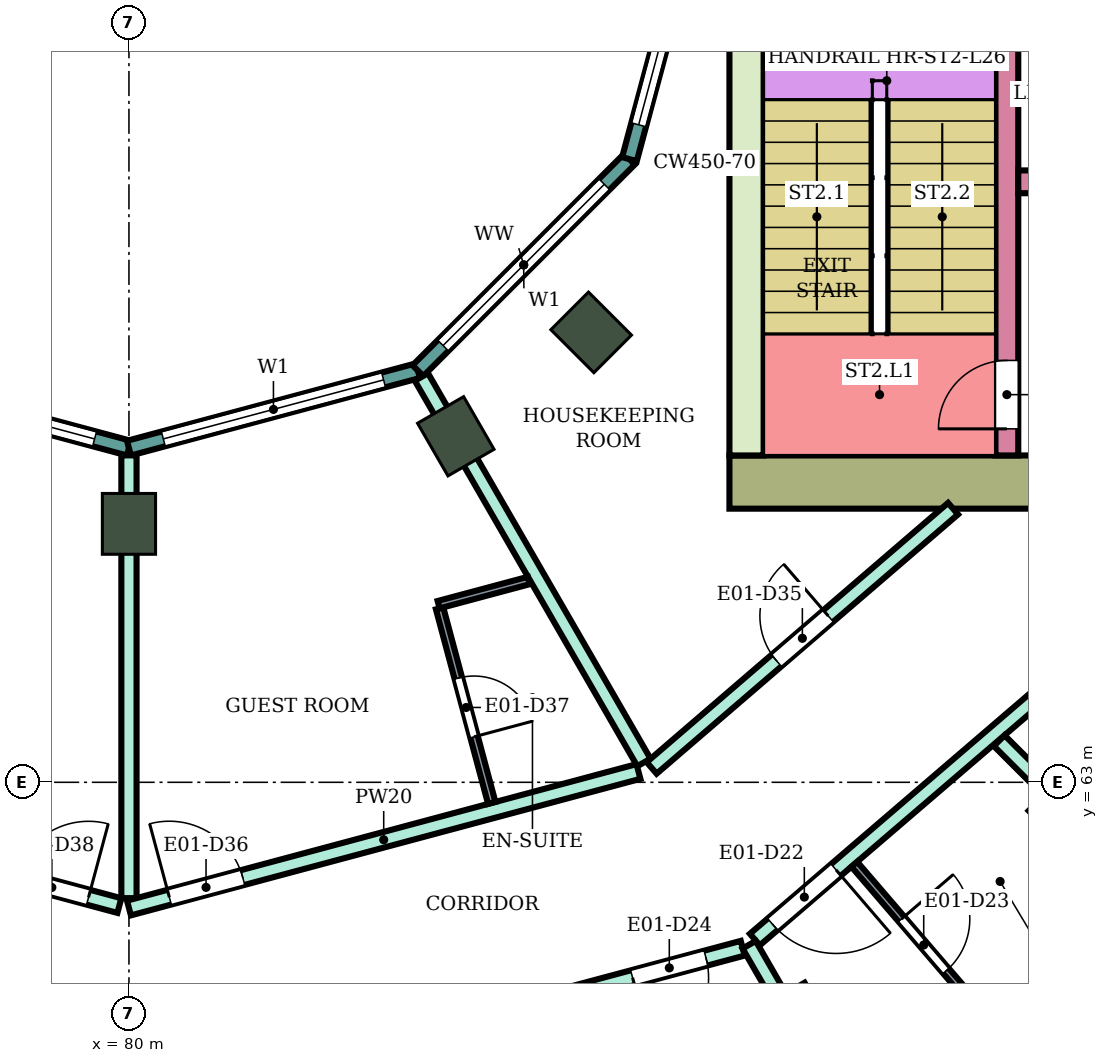
"""IFC4 building model, lengths in metres.
Left out: names, types, materials, properties, quantities, classifications, styles, units other than length and angle.
Written with IfcOpenShell. Run it as: python <this file> out.ifc"""

import sys

from ifc_helpers import new_model, si_unit, direction, frame, frame_2d, origin, origin_2d, place, context, subcontext, project, spatial, rectangle, extrude, element, fill, save


model = new_model("IFC4")
c1 = context("Model", 3, precision=1e-05, world=origin(), true_north=direction((0.0, 1.0)))
c2 = subcontext(c1, "Body", "Model", "MODEL_VIEW")
j1 = project(units=[si_unit("LENGTHUNIT", "METRE"), si_unit("PLANEANGLEUNIT", "RADIAN")], contexts=[c1])
p1 = place(None, origin())
s1 = spatial("IfcSite", under=j1, at=p1, CompositionType="ELEMENT")
p2 = place(p1, origin())
s2 = spatial("IfcBuilding", under=s1, at=p2, CompositionType="ELEMENT")
p3 = place(p2, frame((0.0, 0.0, 114.6)))
s3 = spatial("IfcBuildingStorey", under=s2, at=p3, CompositionType="ELEMENT", Elevation=114.6)
for number, where, z_axis, x_axis in (
    (1, (88.8, 59.758, 0.0), (0.0, 0.0, 1.0), (0.5, -0.866, 0.0)),
    (2, (92.445, 62.555, 0.0), (0.0, 0.0, 1.0), (0.707, -0.707, 0.0)),
):
    element("IfcColumn", number, at=place(p3, frame(where, z_axis=z_axis, x_axis=x_axis)), inside=s3, PredefinedType="COLUMN", context=c2, shape_type="SweptSolid", body=[
        extrude(rectangle(XDim=1.0, YDim=0.8, at=origin_2d()), origin(), (0.0, 0.0, 1.0), 3.9),
    ])
for number, where, z_axis, x_axis in (
    (3, (80.0, 66.4, 0.0), (0.0, 0.0, 1.0), (0.0, -1.0, 0.0)),
    (4, (84.3, 67.552, 0.0), (0.0, 0.0, 1.0), (0.5, -0.866, 0.0)),
    (5, (86.081, 68.919, 0.0), (0.0, 0.0, 1.0), (0.707, -0.707, 0.0)),
):
    element("IfcColumn", number, at=place(p3, frame(where, z_axis=z_axis, x_axis=x_axis)), inside=s3, PredefinedType="COLUMN", context=c2, shape_type="SweptSolid", body=[
        extrude(rectangle(XDim=0.8, YDim=0.7, at=origin_2d()), origin(), (0.0, 0.0, 1.0), 3.9),
    ])
p4 = place(p3, frame((87.9, 66.95, 0.0), z_axis=(0.0, 0.0, 1.0), x_axis=(1.0, 0.0, 0.0)))
e6 = element("IfcWall", 6, at=p4, inside=s3, PredefinedType="SHEAR", context=c2, shape_type="SweptSolid", body=[
    extrude(rectangle(XDim=14.8, YDim=0.7, at=frame_2d((7.4, 0.0))), origin(), (0.0, 0.0, 1.0), 3.58),
])
p5 = place(p4, frame((4.2, 0.0, 0.0)))
e7 = element("IfcOpeningElement", 7, at=p5, cuts=e6, PredefinedType="OPENING", context=c2, shape_type="SweptSolid", body=[
    extrude(rectangle(XDim=2.4, YDim=2.4, at=frame_2d((1.2, 1.2))), frame((0.0, 0.36, 0.0), z_axis=(0.0, -1.0, 0.0), x_axis=(1.0, 0.0, 0.0)), (0.0, 0.0, 1.0), 0.72),
])
p6 = place(p3, frame((88.125, 67.3, 0.0), z_axis=(0.0, 0.0, 1.0), x_axis=(0.0, 1.0, 0.0)))
e8 = element("IfcWall", 8, at=p6, inside=s3, PredefinedType="SHEAR", context=c2, shape_type="SweptSolid", body=[
    extrude(rectangle(XDim=7.7, YDim=0.45, at=frame_2d((3.85, 0.0))), origin(), (0.0, 0.0, 1.0), 3.58),
])
p7 = place(p3, frame((91.55, 67.3, 0.0), z_axis=(0.0, 0.0, 1.0), x_axis=(0.0, 1.0, 0.0)))
e9 = element("IfcWall", 9, at=p7, inside=s3, PredefinedType="SHEAR", context=c2, shape_type="SweptSolid", body=[
    extrude(rectangle(XDim=7.7, YDim=0.3, at=frame_2d((3.85, 0.0))), origin(), (0.0, 0.0, 1.0), 3.58),
])
p8 = place(p7, frame((0.35, 0.0, 0.0)))
e10 = element("IfcOpeningElement", 10, at=p8, cuts=e9, PredefinedType="OPENING", context=c2, shape_type="SweptSolid", body=[
    extrude(rectangle(XDim=0.9, YDim=2.1, at=frame_2d((0.45, 1.05))), frame((0.0, 0.16, 0.0), z_axis=(0.0, -1.0, 0.0), x_axis=(1.0, 0.0, 0.0)), (0.0, 0.0, 1.0), 0.32),
])
p9 = place(p3, frame((91.7, 70.9, 0.0), z_axis=(0.0, 0.0, 1.0), x_axis=(1.0, 0.0, 0.0)))
e11 = element("IfcWall", 11, at=p9, inside=s3, PredefinedType="SHEAR", context=c2, shape_type="SweptSolid", body=[
    extrude(rectangle(XDim=11.0, YDim=0.3, at=frame_2d((5.5, 0.0))), origin(), (0.0, 0.0, 1.0), 3.58),
])
p10 = place(p9, frame((0.4, 0.0, 0.0)))
e12 = element("IfcOpeningElement", 12, at=p10, cuts=e11, PredefinedType="OPENING", context=c2, shape_type="SweptSolid", body=[
    extrude(rectangle(XDim=1.4, YDim=2.1, at=frame_2d((0.7, 1.05))), frame((0.0, 0.16, 0.0), z_axis=(0.0, -1.0, 0.0), x_axis=(1.0, 0.0, 0.0)), (0.0, 0.0, 1.0), 0.32),
])
p11 = place(p9, frame((5.4, 0.0, 0.0)))
e13 = element("IfcOpeningElement", 13, at=p11, cuts=e11, PredefinedType="OPENING", context=c2, shape_type="SweptSolid", body=[
    extrude(rectangle(XDim=1.4, YDim=2.1, at=frame_2d((0.7, 1.05))), frame((0.0, 0.16, 0.0), z_axis=(0.0, -1.0, 0.0), x_axis=(1.0, 0.0, 0.0)), (0.0, 0.0, 1.0), 0.32),
])
p12 = place(p9, frame((8.1, 0.0, 0.0)))
e14 = element("IfcOpeningElement", 14, at=p12, cuts=e11, PredefinedType="OPENING", context=c2, shape_type="SweptSolid", body=[
    extrude(rectangle(XDim=1.0, YDim=2.1, at=frame_2d((0.5, 1.05))), frame((0.0, 0.16, 0.0), z_axis=(0.0, -1.0, 0.0), x_axis=(1.0, 0.0, 0.0)), (0.0, 0.0, 1.0), 0.32),
])
p13 = place(p3, frame((76.198, 68.415, 0.0), z_axis=(0.0, 0.0, 1.0), x_axis=(0.965933654434, -0.258789828301, 0.0)))
e15 = element("IfcWall", 15, at=p13, inside=s3, PredefinedType="NOTDEFINED", context=c2, shape_type="SweptSolid", body=[
    extrude(rectangle(XDim=3.936, YDim=0.2, at=frame_2d((1.968, 0.0))), origin(), (0.0, 0.0, 1.0), 3.9),
])
p14 = place(p13, frame((0.468, 0.0, 0.9)))
e16 = element("IfcOpeningElement", 16, at=p14, cuts=e15, PredefinedType="OPENING", context=c2, shape_type="SweptSolid", body=[
    extrude(rectangle(XDim=3.0, YDim=2.3, at=frame_2d((1.5, 1.15))), frame((0.0, 0.11, 0.0), z_axis=(0.0, -1.0, 0.0), x_axis=(1.0, 0.0, 0.0)), (0.0, 0.0, 1.0), 0.22),
])
p15 = place(p3, frame((80.0, 67.396, 0.0), z_axis=(0.0, 0.0, 1.0), x_axis=(0.965933654434, 0.258789828301, 0.0)))
e17 = element("IfcWall", 17, at=p15, inside=s3, PredefinedType="NOTDEFINED", context=c2, shape_type="SweptSolid", body=[
    extrude(rectangle(XDim=3.936, YDim=0.2, at=frame_2d((1.968, 0.0))), origin(), (0.0, 0.0, 1.0), 3.9),
])
p16 = place(p15, frame((0.468, 0.0, 0.9)))
e18 = element("IfcOpeningElement", 18, at=p16, cuts=e17, PredefinedType="OPENING", context=c2, shape_type="SweptSolid", body=[
    extrude(rectangle(XDim=3.0, YDim=2.3, at=frame_2d((1.5, 1.15))), frame((0.0, 0.11, 0.0), z_axis=(0.0, -1.0, 0.0), x_axis=(1.0, 0.0, 0.0)), (0.0, 0.0, 1.0), 0.22),
])
p17 = place(p3, frame((83.802, 68.415, 0.0), z_axis=(0.0, 0.0, 1.0), x_axis=(0.707106781187, 0.707106781187, 0.0)))
e19 = element("IfcWall", 19, at=p17, inside=s3, PredefinedType="NOTDEFINED", context=c2, shape_type="SweptSolid", body=[
    extrude(rectangle(XDim=3.936, YDim=0.2, at=frame_2d((1.968, 0.0))), origin(), (0.0, 0.0, 1.0), 3.9),
])
p18 = place(p17, frame((0.468, 0.0, 0.9)))
e20 = element("IfcOpeningElement", 20, at=p18, cuts=e19, PredefinedType="OPENING", context=c2, shape_type="SweptSolid", body=[
    extrude(rectangle(XDim=3.0, YDim=2.3, at=frame_2d((1.5, 1.15))), frame((0.0, 0.11, 0.0), z_axis=(0.0, -1.0, 0.0), x_axis=(1.0, 0.0, 0.0)), (0.0, 0.0, 1.0), 0.22),
])
p19 = place(p3, frame((86.585, 71.198, 0.0), z_axis=(0.0, 0.0, 1.0), x_axis=(0.258789828301, 0.965933654434, 0.0)))
e21 = element("IfcWall", 21, at=p19, inside=s3, PredefinedType="NOTDEFINED", context=c2, shape_type="SweptSolid", body=[
    extrude(rectangle(XDim=3.936, YDim=0.2, at=frame_2d((1.968, 0.0))), origin(), (0.0, 0.0, 1.0), 3.9),
])
p20 = place(p19, frame((0.468, 0.0, 0.9)))
e22 = element("IfcOpeningElement", 22, at=p20, cuts=e21, PredefinedType="OPENING", context=c2, shape_type="SweptSolid", body=[
    extrude(rectangle(XDim=3.0, YDim=2.3, at=frame_2d((1.5, 1.15))), frame((0.0, 0.11, 0.0), z_axis=(0.0, -1.0, 0.0), x_axis=(1.0, 0.0, 0.0)), (0.0, 0.0, 1.0), 0.22),
])
p21 = place(p3, frame((71.877, 60.832, 0.0), z_axis=(0.0, 0.0, 1.0), x_axis=(0.965857276008, -0.259074742848, 0.0)))
e23 = element("IfcWall", 23, at=p21, inside=s3, PredefinedType="PARTITIONING", context=c2, shape_type="SweptSolid", body=[
    extrude(rectangle(XDim=8.36, YDim=0.2, at=frame_2d((4.18, 0.0))), origin(), (0.0, 0.0, 1.0), 3.45),
])
p22 = place(p21, frame((0.55, 0.0, 0.0)))
e24 = element("IfcOpeningElement", 24, at=p22, cuts=e23, PredefinedType="OPENING", context=c2, shape_type="SweptSolid", body=[
    extrude(rectangle(XDim=1.0, YDim=2.1, at=frame_2d((0.5, 1.05))), frame((0.0, 0.11, 0.0), z_axis=(0.0, -1.0, 0.0), x_axis=(1.0, 0.0, 0.0)), (0.0, 0.0, 1.0), 0.22),
])
p23 = place(p3, frame((73.297, 63.143, 0.0), z_axis=(0.0, 0.0, 1.0), x_axis=(0.965859030528, -0.25906820173, 0.0)))
e25 = element("IfcWall", 25, at=p23, inside=s3, PredefinedType="PARTITIONING", context=c2, shape_type="SweptSolid", body=[
    extrude(rectangle(XDim=6.81, YDim=0.2, at=frame_2d((3.405, 0.0))), origin(), (0.0, 0.0, 1.0), 3.45),
])
p24 = place(p23, frame((5.39, 0.0, 0.0)))
e26 = element("IfcOpeningElement", 26, at=p24, cuts=e25, PredefinedType="OPENING", context=c2, shape_type="SweptSolid", body=[
    extrude(rectangle(XDim=1.0, YDim=2.1, at=frame_2d((0.5, 1.05))), frame((0.0, 0.11, 0.0), z_axis=(0.0, -1.0, 0.0), x_axis=(1.0, 0.0, 0.0)), (0.0, 0.0, 1.0), 0.22),
])
p25 = place(p3, frame((80.0, 58.655, 0.0), z_axis=(0.0, 0.0, 1.0), x_axis=(0.965967338894, 0.258664068224, 0.0)))
e27 = element("IfcWall", 27, at=p25, inside=s3, PredefinedType="PARTITIONING", context=c2, shape_type="SweptSolid", body=[
    extrude(rectangle(XDim=8.36, YDim=0.2, at=frame_2d((4.18, 0.0))), origin(), (0.0, 0.0, 1.0), 3.45),
])
p26 = place(p25, frame((6.86, 0.0, 0.0)))
e28 = element("IfcOpeningElement", 28, at=p26, cuts=e27, PredefinedType="OPENING", context=c2, shape_type="SweptSolid", body=[
    extrude(rectangle(XDim=1.0, YDim=2.1, at=frame_2d((0.5, 1.05))), frame((0.0, 0.11, 0.0), z_axis=(0.0, -1.0, 0.0), x_axis=(1.0, 0.0, 0.0)), (0.0, 0.0, 1.0), 0.22),
])
p27 = place(p25, frame((2.7, 0.0, 0.0)))
e29 = element("IfcOpeningElement", 29, at=p27, cuts=e27, PredefinedType="OPENING", context=c2, shape_type="SweptSolid", body=[
    extrude(rectangle(XDim=1.0, YDim=2.1, at=frame_2d((0.5, 1.05))), frame((0.0, 0.11, 0.0), z_axis=(0.0, -1.0, 0.0), x_axis=(1.0, 0.0, 0.0)), (0.0, 0.0, 1.0), 0.22),
])
p28 = place(p3, frame((80.0, 61.476, 0.0), z_axis=(0.0, 0.0, 1.0), x_axis=(0.0, 1.0, 0.0)))
e30 = element("IfcWall", 30, at=p28, inside=s3, PredefinedType="PARTITIONING", context=c2, shape_type="SweptSolid", body=[
    extrude(rectangle(XDim=5.825, YDim=0.2, at=frame_2d((2.913, 0.0))), origin(), (0.0, 0.0, 1.0), 3.45),
])
p29 = place(p3, frame((80.0, 61.346, 0.0), z_axis=(0.0, 0.0, 1.0), x_axis=(0.965924181808, 0.258825182312, 0.0)))
e31 = element("IfcWall", 31, at=p29, inside=s3, PredefinedType="PARTITIONING", context=c2, shape_type="SweptSolid", body=[
    extrude(rectangle(XDim=6.94, YDim=0.2, at=frame_2d((3.47, 0.0))), origin(), (0.0, 0.0, 1.0), 3.45),
])
p30 = place(p29, frame((0.55, 0.0, 0.0)))
e32 = element("IfcOpeningElement", 32, at=p30, cuts=e31, PredefinedType="OPENING", context=c2, shape_type="SweptSolid", body=[
    extrude(rectangle(XDim=1.0, YDim=2.1, at=frame_2d((0.5, 1.05))), frame((0.0, 0.11, 0.0), z_axis=(0.0, -1.0, 0.0), x_axis=(1.0, 0.0, 0.0)), (0.0, 0.0, 1.0), 0.22),
])
p31 = place(p3, frame((83.848, 68.332, 0.0), z_axis=(0.0, 0.0, 1.0), x_axis=(0.499933000352, -0.866064082594, 0.0)))
e33 = element("IfcWall", 33, at=p31, inside=s3, PredefinedType="PARTITIONING", context=c2, shape_type="SweptSolid", body=[
    extrude(rectangle(XDim=5.855, YDim=0.2, at=frame_2d((2.928, 0.0))), origin(), (0.0, 0.0, 1.0), 3.45),
])
p32 = place(p3, frame((86.877, 63.189, 0.0), z_axis=(0.0, 0.0, 1.0), x_axis=(0.758075808328, 0.652166442581, 0.0)))
e34 = element("IfcWall", 34, at=p32, inside=s3, PredefinedType="PARTITIONING", context=c2, shape_type="SweptSolid", body=[
    extrude(rectangle(XDim=5.23, YDim=0.2, at=frame_2d((2.615, 0.0))), origin(), (0.0, 0.0, 1.0), 3.45),
])
p33 = place(p32, frame((2.165, 0.0, 0.0)))
e35 = element("IfcOpeningElement", 35, at=p33, cuts=e34, PredefinedType="OPENING", context=c2, shape_type="SweptSolid", body=[
    extrude(rectangle(XDim=0.9, YDim=2.1, at=frame_2d((0.45, 1.05))), frame((0.0, 0.11, 0.0), z_axis=(0.0, -1.0, 0.0), x_axis=(1.0, 0.0, 0.0)), (0.0, 0.0, 1.0), 0.22),
])
p34 = place(p3, frame((88.235, 60.931, 0.0), z_axis=(0.0, 0.0, 1.0), x_axis=(0.758816241808, 0.651304775945, 0.0)))
e36 = element("IfcWall", 36, at=p34, inside=s3, PredefinedType="PARTITIONING", context=c2, shape_type="SweptSolid", body=[
    extrude(rectangle(XDim=6.186, YDim=0.2, at=frame_2d((3.093, 0.0))), origin(), (0.0, 0.0, 1.0), 3.45),
])
p35 = place(p34, frame((0.308, 0.0, 0.0)))
e37 = element("IfcOpeningElement", 37, at=p35, cuts=e36, PredefinedType="OPENING", context=c2, shape_type="SweptSolid", body=[
    extrude(rectangle(XDim=1.1, YDim=2.1, at=frame_2d((0.55, 1.05))), frame((0.0, 0.11, 0.0), z_axis=(0.0, -1.0, 0.0), x_axis=(1.0, 0.0, 0.0)), (0.0, 0.0, 1.0), 0.22),
])
p36 = place(p3, frame((88.159, 60.863, 0.0), z_axis=(0.0, 0.0, 1.0), x_axis=(0.499935840196, -0.866062443296, 0.0)))
e38 = element("IfcWall", 38, at=p36, inside=s3, PredefinedType="PARTITIONING", context=c2, shape_type="SweptSolid", body=[
    extrude(rectangle(XDim=9.475, YDim=0.2, at=frame_2d((4.737, 0.0))), origin(), (0.0, 0.0, 1.0), 3.45),
])
p37 = place(p3, frame((91.449, 63.548, 0.0), z_axis=(0.0, 0.0, 1.0), x_axis=(0.706984804638, -0.707228736698, 0.0)))
e39 = element("IfcWall", 39, at=p37, inside=s3, PredefinedType="PARTITIONING", context=c2, shape_type="SweptSolid", body=[
    extrude(rectangle(XDim=7.006, YDim=0.2, at=frame_2d((3.503, 0.0))), origin(), (0.0, 0.0, 1.0), 3.45),
])
p38 = place(p3, frame((84.087, 65.289, 0.0), z_axis=(0.0, 0.0, 1.0), x_axis=(0.258929459649, -0.965896234037, 0.0)))
e40 = element("IfcWall", 40, at=p38, inside=s3, PredefinedType="PARTITIONING", context=c2, shape_type="SweptSolid", body=[
    extrude(rectangle(XDim=2.65, YDim=0.1, at=frame_2d((1.325, 0.0))), origin(), (0.0, 0.0, 1.0), 3.45),
])
p39 = place(p38, frame((0.95, 0.0, 0.0)))
e41 = element("IfcOpeningElement", 41, at=p39, cuts=e40, PredefinedType="OPENING", context=c2, shape_type="SweptSolid", body=[
    extrude(rectangle(XDim=0.8, YDim=2.1, at=frame_2d((0.4, 1.05))), frame((0.0, 0.06, 0.0), z_axis=(0.0, -1.0, 0.0), x_axis=(1.0, 0.0, 0.0)), (0.0, 0.0, 1.0), 0.12),
])
p40 = place(p3, frame((84.074, 65.337, 0.0), z_axis=(0.0, 0.0, 1.0), x_axis=(0.965914351064, 0.258861867428, 0.0)))
e42 = element("IfcWall", 42, at=p40, inside=s3, PredefinedType="PARTITIONING", context=c2, shape_type="SweptSolid", body=[
    extrude(rectangle(XDim=1.229, YDim=0.1, at=frame_2d((0.615, 0.0))), origin(), (0.0, 0.0, 1.0), 3.45),
])
p41 = place(p3, frame((89.543, 61.921, 0.0), z_axis=(0.0, 0.0, 1.0), x_axis=(0.651996917864, -0.758221616083, 0.0)))
e43 = element("IfcWall", 43, at=p41, inside=s3, PredefinedType="PARTITIONING", context=c2, shape_type="SweptSolid", body=[
    extrude(rectangle(XDim=2.85, YDim=0.1, at=frame_2d((1.425, 0.0))), origin(), (0.0, 0.0, 1.0), 3.45),
])
p42 = place(p41, frame((0.95, 0.0, 0.0)))
e44 = element("IfcOpeningElement", 44, at=p42, cuts=e43, PredefinedType="OPENING", context=c2, shape_type="SweptSolid", body=[
    extrude(rectangle(XDim=0.9, YDim=2.1, at=frame_2d((0.45, 1.05))), frame((0.0, 0.06, 0.0), z_axis=(0.0, -1.0, 0.0), x_axis=(1.0, 0.0, 0.0)), (0.0, 0.0, 1.0), 0.12),
])
p43 = place(p3, frame((91.434, 59.722, 0.0), z_axis=(0.0, 0.0, 1.0), x_axis=(0.758076316785, 0.652165851552, 0.0)))
e45 = element("IfcWall", 45, at=p43, inside=s3, PredefinedType="PARTITIONING", context=c2, shape_type="SweptSolid", body=[
    extrude(rectangle(XDim=2.616, YDim=0.1, at=frame_2d((1.308, 0.0))), origin(), (0.0, 0.0, 1.0), 3.45),
])
p44 = place(p14, origin())
e46 = element("IfcWindow", 46, at=p44, inside=s3, PartitioningType="SINGLE_PANEL", PredefinedType="WINDOW", context=c2, shape_type="SweptSolid", body=[
    extrude(rectangle(XDim=3.0, YDim=2.3, at=frame_2d((1.5, 1.15))), frame((0.0, 0.03, 0.0), z_axis=(0.0, -1.0, 0.0), x_axis=(1.0, 0.0, 0.0)), (0.0, 0.0, 1.0), 0.06),
])
fill(e16, e46)
p45 = place(p16, origin())
e47 = element("IfcWindow", 47, at=p45, inside=s3, PartitioningType="SINGLE_PANEL", PredefinedType="WINDOW", context=c2, shape_type="SweptSolid", body=[
    extrude(rectangle(XDim=3.0, YDim=2.3, at=frame_2d((1.5, 1.15))), frame((0.0, 0.03, 0.0), z_axis=(0.0, -1.0, 0.0), x_axis=(1.0, 0.0, 0.0)), (0.0, 0.0, 1.0), 0.06),
])
fill(e18, e47)
p46 = place(p18, origin())
e48 = element("IfcWindow", 48, at=p46, inside=s3, PartitioningType="SINGLE_PANEL", PredefinedType="WINDOW", context=c2, shape_type="SweptSolid", body=[
    extrude(rectangle(XDim=3.0, YDim=2.3, at=frame_2d((1.5, 1.15))), frame((0.0, 0.03, 0.0), z_axis=(0.0, -1.0, 0.0), x_axis=(1.0, 0.0, 0.0)), (0.0, 0.0, 1.0), 0.06),
])
fill(e20, e48)
p47 = place(p20, origin())
e49 = element("IfcWindow", 49, at=p47, inside=s3, PartitioningType="SINGLE_PANEL", PredefinedType="WINDOW", context=c2, shape_type="SweptSolid", body=[
    extrude(rectangle(XDim=3.0, YDim=2.3, at=frame_2d((1.5, 1.15))), frame((0.0, 0.03, 0.0), z_axis=(0.0, -1.0, 0.0), x_axis=(1.0, 0.0, 0.0)), (0.0, 0.0, 1.0), 0.06),
])
fill(e22, e49)
p48 = place(p35, frame((1.1, 0.0, 0.0), z_axis=(0.0, 0.0, 1.0), x_axis=(-1.0, 0.0, 0.0)))
e50 = element("IfcDoor", 50, at=p48, inside=s3, OperationType="SINGLE_SWING_LEFT", PredefinedType="DOOR", context=c2, shape_type="SweptSolid", body=[
    extrude(rectangle(XDim=1.1, YDim=2.1, at=frame_2d((0.55, 1.05))), frame((0.0, 0.025, 0.0), z_axis=(0.0, -1.0, 0.0), x_axis=(1.0, 0.0, 0.0)), (0.0, 0.0, 1.0), 0.05),
])
fill(e37, e50)
p49 = place(p42, origin())
e51 = element("IfcDoor", 51, at=p49, inside=s3, OperationType="SINGLE_SWING_LEFT", PredefinedType="DOOR", context=c2, shape_type="SweptSolid", body=[
    extrude(rectangle(XDim=0.9, YDim=2.1, at=frame_2d((0.45, 1.05))), frame((0.0, 0.025, 0.0), z_axis=(0.0, -1.0, 0.0), x_axis=(1.0, 0.0, 0.0)), (0.0, 0.0, 1.0), 0.05),
])
fill(e44, e51)
p50 = place(p26, frame((1.0, 0.0, 0.0), z_axis=(0.0, 0.0, 1.0), x_axis=(-1.0, 0.0, 0.0)))
e52 = element("IfcDoor", 52, at=p50, inside=s3, OperationType="SINGLE_SWING_RIGHT", PredefinedType="DOOR", context=c2, shape_type="SweptSolid", body=[
    extrude(rectangle(XDim=1.0, YDim=2.1, at=frame_2d((0.5, 1.05))), frame((0.0, 0.025, 0.0), z_axis=(0.0, -1.0, 0.0), x_axis=(1.0, 0.0, 0.0)), (0.0, 0.0, 1.0), 0.05),
])
fill(e28, e52)
p51 = place(p33, origin())
e53 = element("IfcDoor", 53, at=p51, inside=s3, OperationType="SINGLE_SWING_RIGHT", PredefinedType="DOOR", context=c2, shape_type="SweptSolid", body=[
    extrude(rectangle(XDim=0.9, YDim=2.1, at=frame_2d((0.45, 1.05))), frame((0.0, 0.025, 0.0), z_axis=(0.0, -1.0, 0.0), x_axis=(1.0, 0.0, 0.0)), (0.0, 0.0, 1.0), 0.05),
])
fill(e35, e53)
p52 = place(p30, origin())
e54 = element("IfcDoor", 54, at=p52, inside=s3, OperationType="SINGLE_SWING_LEFT", PredefinedType="DOOR", context=c2, shape_type="SweptSolid", body=[
    extrude(rectangle(XDim=1.0, YDim=2.1, at=frame_2d((0.5, 1.05))), frame((0.0, 0.025, 0.0), z_axis=(0.0, -1.0, 0.0), x_axis=(1.0, 0.0, 0.0)), (0.0, 0.0, 1.0), 0.05),
])
fill(e32, e54)
p53 = place(p39, origin())
e55 = element("IfcDoor", 55, at=p53, inside=s3, OperationType="SINGLE_SWING_RIGHT", PredefinedType="DOOR", context=c2, shape_type="SweptSolid", body=[
    extrude(rectangle(XDim=0.8, YDim=2.1, at=frame_2d((0.4, 1.05))), frame((0.0, 0.025, 0.0), z_axis=(0.0, -1.0, 0.0), x_axis=(1.0, 0.0, 0.0)), (0.0, 0.0, 1.0), 0.05),
])
fill(e41, e55)
p54 = place(p24, origin())
e56 = element("IfcDoor", 56, at=p54, inside=s3, OperationType="SINGLE_SWING_RIGHT", PredefinedType="DOOR", context=c2, shape_type="SweptSolid", body=[
    extrude(rectangle(XDim=1.0, YDim=2.1, at=frame_2d((0.5, 1.05))), frame((0.0, 0.025, 0.0), z_axis=(0.0, -1.0, 0.0), x_axis=(1.0, 0.0, 0.0)), (0.0, 0.0, 1.0), 0.05),
])
fill(e26, e56)
p55 = place(p8, origin())
e57 = element("IfcDoor", 57, at=p55, inside=s3, OperationType="SINGLE_SWING_LEFT", PredefinedType="DOOR", context=c2, shape_type="SweptSolid", body=[
    extrude(rectangle(XDim=0.9, YDim=2.1, at=frame_2d((0.45, 1.05))), frame((0.0, 0.025, 0.0), z_axis=(0.0, -1.0, 0.0), x_axis=(1.0, 0.0, 0.0)), (0.0, 0.0, 1.0), 0.05),
])
fill(e10, e57)
save(model, sys.argv[1])
